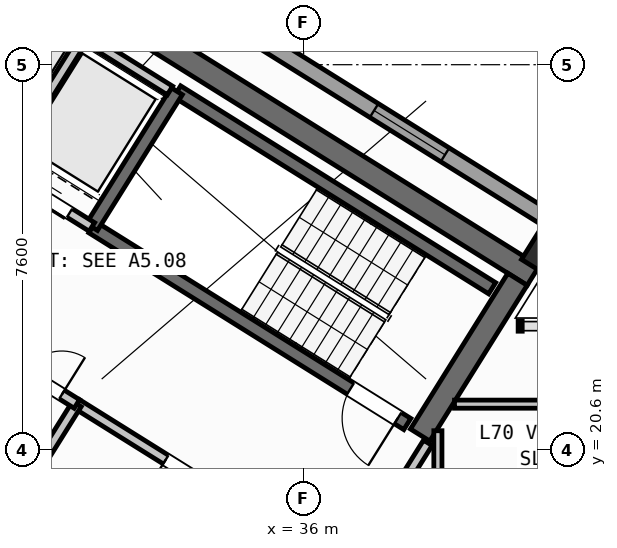
"""IFC4 building model, lengths in metres.
Left out: names, types, materials, properties, quantities, classifications, styles, units other than length and angle.
Written with IfcOpenShell. Run it as: python <this file> out.ifc"""

import sys

from ifc_helpers import new_model, si_unit, direction, frame, frame_2d, origin, origin_2d, place, context, subcontext, project, spatial, rectangle, hollow_rectangle, extrude, source, transform, mapped, element, fill, save


model = new_model("IFC4")
c1 = context("Model", 3, precision=1e-05, world=origin(), true_north=direction((0.0, 1.0)))
c2 = subcontext(c1, "Body", "Model", "MODEL_VIEW")
j1 = project(units=[si_unit("LENGTHUNIT", "METRE"), si_unit("PLANEANGLEUNIT", "RADIAN")], contexts=[c1])
p1 = place(None, origin())
s1 = spatial("IfcSite", under=j1, at=p1, CompositionType="ELEMENT")
p2 = place(p1, origin())
s2 = spatial("IfcBuilding", under=s1, at=p2, CompositionType="ELEMENT")
p3 = place(p2, frame((0.0, 0.0, 277.2)))
s3 = spatial("IfcBuildingStorey", under=s2, at=p3, CompositionType="ELEMENT", Elevation=277.2)
p4 = place(p3, frame((40.531, 24.036, 0.0), z_axis=(0.0, 0.0, 1.0), x_axis=(-0.848048787466, 0.529918157905, 0.0)))
e1 = element("IfcWall", 1, at=p4, inside=s3, PredefinedType="SHEAR", context=c2, shape_type="SweptSolid", body=[
    extrude(rectangle(XDim=13.04, YDim=0.45, at=frame_2d((6.52, 0.0))), origin(), (0.0, 0.0, 1.0), 3.35),
])
p5 = place(p3, frame((40.221, 23.965, 0.0), z_axis=(0.0, 0.0, 1.0), x_axis=(-0.529902075036, -0.848058836916, 0.0)))
e2 = element("IfcWall", 2, at=p5, inside=s3, PredefinedType="SHEAR", context=c2, shape_type="SweptSolid", body=[
    extrude(rectangle(XDim=3.625, YDim=0.45, at=frame_2d((1.812, 0.0))), origin(), (0.0, 0.0, 1.0), 3.35),
])
m1 = source(origin(), c2, "Body", "SweptSolid", [
    extrude(hollow_rectangle(XDim=0.7, YDim=0.7, WallThickness=0.028, at=origin_2d()), origin(), (0.0, 0.0, 1.0), 3.6),
])
p6 = place(p3, frame((40.783, 24.469, 0.0), z_axis=(0.0, 0.0, 1.0), x_axis=(-0.848048096156, 0.529919264233, 0.0)))
e3 = element("IfcColumn", 3, at=p6, inside=s3, PredefinedType="COLUMN", context=c2, shape_type="MappedRepresentation", body=[
    mapped(m1, transform((0.0, 0.0, 0.0), scale=1.0)),
])
p7 = place(p3, frame((14.138, 41.825, 0.0), z_axis=(0.0, 0.0, 1.0), x_axis=(0.848046498049, -0.529921821731, 0.0)))
e4 = element("IfcWall", 4, at=p7, inside=s3, PredefinedType="STANDARD", context=c2, shape_type="SweptSolid", body=[
    extrude(rectangle(XDim=31.588, YDim=0.32, at=frame_2d((15.794, 0.0))), origin(), (0.0, 0.0, 1.0), 3.35),
])
p8 = place(p7, frame((3.568, 0.0, 0.0)))
e5 = element("IfcOpeningElement", 5, at=p8, cuts=e4, PredefinedType="OPENING", context=c2, shape_type="SweptSolid", body=[
    extrude(rectangle(XDim=1.05, YDim=2.15, at=frame_2d((0.525, 1.075))), frame((0.0, 0.17, 0.0), z_axis=(0.0, -1.0, 0.0), x_axis=(1.0, 0.0, 0.0)), (0.0, 0.0, 1.0), 0.34),
])
p9 = place(p7, frame((1.046, 0.0, 0.9)))
e6 = element("IfcOpeningElement", 6, at=p9, cuts=e4, PredefinedType="OPENING", context=c2, shape_type="SweptSolid", body=[
    extrude(rectangle(XDim=1.65, YDim=1.45, at=frame_2d((0.825, 0.725))), frame((0.0, 0.17, 0.0), z_axis=(0.0, -1.0, 0.0), x_axis=(1.0, 0.0, 0.0)), (0.0, 0.0, 1.0), 0.34),
])
p10 = place(p7, frame((8.61, 0.0, 0.9)))
e7 = element("IfcOpeningElement", 7, at=p10, cuts=e4, PredefinedType="OPENING", context=c2, shape_type="SweptSolid", body=[
    extrude(rectangle(XDim=1.35, YDim=1.45, at=frame_2d((0.675, 0.725))), frame((0.0, 0.17, 0.0), z_axis=(0.0, -1.0, 0.0), x_axis=(1.0, 0.0, 0.0)), (0.0, 0.0, 1.0), 0.34),
])
p11 = place(p7, frame((13.599, 0.0, 0.95)))
e8 = element("IfcOpeningElement", 8, at=p11, cuts=e4, PredefinedType="OPENING", context=c2, shape_type="SweptSolid", body=[
    extrude(rectangle(XDim=1.95, YDim=1.35, at=frame_2d((0.975, 0.675))), frame((0.0, 0.17, 0.0), z_axis=(0.0, -1.0, 0.0), x_axis=(1.0, 0.0, 0.0)), (0.0, 0.0, 1.0), 0.34),
])
p12 = place(p7, frame((17.154, 0.0, 1.0)))
e9 = element("IfcOpeningElement", 9, at=p12, cuts=e4, PredefinedType="OPENING", context=c2, shape_type="SweptSolid", body=[
    extrude(rectangle(XDim=0.9, YDim=1.25, at=frame_2d((0.45, 0.625))), frame((0.0, 0.17, 0.0), z_axis=(0.0, -1.0, 0.0), x_axis=(1.0, 0.0, 0.0)), (0.0, 0.0, 1.0), 0.34),
])
p13 = place(p7, frame((21.719, 0.0, 0.9)))
e10 = element("IfcOpeningElement", 10, at=p13, cuts=e4, PredefinedType="OPENING", context=c2, shape_type="SweptSolid", body=[
    extrude(rectangle(XDim=1.65, YDim=1.45, at=frame_2d((0.825, 0.725))), frame((0.0, 0.17, 0.0), z_axis=(0.0, -1.0, 0.0), x_axis=(1.0, 0.0, 0.0)), (0.0, 0.0, 1.0), 0.34),
])
p14 = place(p7, frame((27.419, 0.0, 0.9)))
e11 = element("IfcOpeningElement", 11, at=p14, cuts=e4, PredefinedType="OPENING", context=c2, shape_type="SweptSolid", body=[
    extrude(rectangle(XDim=1.65, YDim=1.45, at=frame_2d((0.825, 0.725))), frame((0.0, 0.17, 0.0), z_axis=(0.0, -1.0, 0.0), x_axis=(1.0, 0.0, 0.0)), (0.0, 0.0, 1.0), 0.34),
])
p15 = place(p3, frame((31.28, 18.261, 0.0), z_axis=(0.0, 0.0, 1.0), x_axis=(-0.848051618787, 0.529913626805, 0.0)))
e12 = element("IfcWall", 12, at=p15, inside=s3, PredefinedType="SHEAR", context=c2, shape_type="SweptSolid", body=[
    extrude(rectangle(XDim=7.46, YDim=0.26, at=frame_2d((3.73, 0.0))), origin(), (0.0, 0.0, 1.0), 3.35),
])
p16 = place(p15, frame((0.36, 0.0, 0.0)))
e13 = element("IfcOpeningElement", 13, at=p16, cuts=e12, PredefinedType="OPENING", context=c2, shape_type="SweptSolid", body=[
    extrude(rectangle(XDim=0.86, YDim=2.05, at=frame_2d((0.43, 1.025))), frame((0.0, 0.14, 0.0), z_axis=(0.0, -1.0, 0.0), x_axis=(1.0, 0.0, 0.0)), (0.0, 0.0, 1.0), 0.28),
])
p17 = place(p3, frame((39.721, 23.788, 0.0), z_axis=(0.0, 0.0, 1.0), x_axis=(-0.848054434086, 0.529909121291, 0.0)))
e14 = element("IfcWall", 14, at=p17, inside=s3, PredefinedType="SHEAR", context=c2, shape_type="SweptSolid", body=[
    extrude(rectangle(XDim=7.33, YDim=0.26, at=frame_2d((3.665, 0.0))), origin(), (0.0, 0.0, 1.0), 3.35),
])
p18 = place(p3, frame((38.046, 21.108, 0.0), z_axis=(0.0, 0.0, 1.0), x_axis=(-0.848054434086, 0.529909121291, 0.0)))
e15 = element("IfcWall", 15, at=p18, inside=s3, PredefinedType="SHEAR", context=c2, shape_type="SweptSolid", body=[
    extrude(rectangle(XDim=7.33, YDim=0.26, at=frame_2d((3.665, 0.0))), origin(), (0.0, 0.0, 1.0), 3.35),
])
p19 = place(p18, frame((0.22, 0.0, 0.0)))
e16 = element("IfcOpeningElement", 16, at=p19, cuts=e15, PredefinedType="OPENING", context=c2, shape_type="SweptSolid", body=[
    extrude(rectangle(XDim=1.1, YDim=2.1, at=frame_2d((0.55, 1.05))), frame((0.0, 0.14, 0.0), z_axis=(0.0, -1.0, 0.0), x_axis=(1.0, 0.0, 0.0)), (0.0, 0.0, 1.0), 0.28),
])
p20 = place(p3, frame((33.496, 27.677, 0.0), z_axis=(0.0, 0.0, 1.0), x_axis=(-0.529908658664, -0.84805472316, 0.0)))
e17 = element("IfcWall", 17, at=p20, inside=s3, PredefinedType="SHEAR", context=c2, shape_type="SweptSolid", body=[
    extrude(rectangle(XDim=3.16, YDim=0.26, at=frame_2d((1.58, 0.0))), origin(), (0.0, 0.0, 1.0), 3.35),
])
p21 = place(p3, frame((36.459, 18.421, 0.0), z_axis=(0.0, 0.0, 1.0), x_axis=(-0.848059591691, 0.529900867089, 0.0)))
e18 = element("IfcWall", 18, at=p21, inside=s3, PredefinedType="STANDARD", context=c2, shape_type="SweptSolid", body=[
    extrude(rectangle(XDim=5.818, YDim=0.2, at=frame_2d((2.909, 0.0))), origin(), (0.0, 0.0, 1.0), 3.34),
])
p22 = place(p21, frame((2.598, 0.0, 0.0)))
e19 = element("IfcOpeningElement", 19, at=p22, cuts=e18, PredefinedType="OPENING", context=c2, shape_type="SweptSolid", body=[
    extrude(rectangle(XDim=1.15, YDim=2.1, at=frame_2d((0.575, 1.05))), frame((0.0, 0.11, 0.0), z_axis=(0.0, -1.0, 0.0), x_axis=(1.0, 0.0, 0.0)), (0.0, 0.0, 1.0), 0.22),
])
p23 = place(p3, frame((31.822, 24.998, 0.0), z_axis=(0.0, 0.0, 1.0), x_axis=(-0.848054125777, 0.529909614701, 0.0)))
e20 = element("IfcWall", 20, at=p23, inside=s3, PredefinedType="STANDARD", context=c2, shape_type="SweptSolid", body=[
    extrude(rectangle(XDim=4.668, YDim=0.2, at=frame_2d((2.334, 0.0))), origin(), (0.0, 0.0, 1.0), 3.34),
])
p24 = place(p23, frame((0.52, 0.0, 0.0)))
e21 = element("IfcOpeningElement", 21, at=p24, cuts=e20, PredefinedType="OPENING", context=c2, shape_type="SweptSolid", body=[
    extrude(rectangle(XDim=1.2, YDim=2.15, at=frame_2d((0.6, 1.075))), frame((0.0, 0.11, 0.0), z_axis=(0.0, -1.0, 0.0), x_axis=(1.0, 0.0, 0.0)), (0.0, 0.0, 1.0), 0.22),
])
p25 = place(p23, frame((2.54, 0.0, 0.0)))
e22 = element("IfcOpeningElement", 22, at=p25, cuts=e20, PredefinedType="OPENING", context=c2, shape_type="SweptSolid", body=[
    extrude(rectangle(XDim=1.2, YDim=2.15, at=frame_2d((0.6, 1.075))), frame((0.0, 0.11, 0.0), z_axis=(0.0, -1.0, 0.0), x_axis=(1.0, 0.0, 0.0)), (0.0, 0.0, 1.0), 0.22),
])
p26 = place(p3, frame((31.645, 28.716, 0.0), z_axis=(0.0, 0.0, 1.0), x_axis=(-0.52986693015, -0.848080795876, 0.0)))
e23 = element("IfcWall", 23, at=p26, inside=s3, PredefinedType="STANDARD", context=c2, shape_type="SweptSolid", body=[
    extrude(rectangle(XDim=2.66, YDim=0.2, at=frame_2d((1.33, 0.0))), origin(), (0.0, 0.0, 1.0), 3.34),
])
p27 = place(p3, frame((33.363, 27.69, 0.0), z_axis=(0.0, 0.0, 1.0), x_axis=(-0.84804957148, 0.529916903215, 0.0)))
e24 = element("IfcWall", 24, at=p27, inside=s3, PredefinedType="STANDARD", context=c2, shape_type="SweptSolid", body=[
    extrude(rectangle(XDim=4.548, YDim=0.2, at=frame_2d((2.274, 0.0))), origin(), (0.0, 0.0, 1.0), 3.34),
])
p28 = place(p3, frame((31.525, 21.504, 0.0), z_axis=(0.0, 0.0, 1.0), x_axis=(-0.529907497854, -0.848055448493, 0.0)))
e25 = element("IfcWall", 25, at=p28, inside=s3, PredefinedType="STANDARD", context=c2, shape_type="SweptSolid", body=[
    extrude(rectangle(XDim=2.88, YDim=0.2, at=frame_2d((1.44, 0.0))), origin(), (0.0, 0.0, 1.0), 3.34),
])
p29 = place(p3, frame((31.525, 21.504, 0.0), z_axis=(0.0, 0.0, 1.0), x_axis=(-0.848042066329, 0.529928913853, 0.0)))
e26 = element("IfcWall", 26, at=p29, inside=s3, PredefinedType="STANDARD", context=c2, shape_type="SweptSolid", body=[
    extrude(rectangle(XDim=6.268, YDim=0.2, at=frame_2d((3.134, 0.0))), origin(), (0.0, 0.0, 1.0), 3.34),
])
p30 = place(p29, frame((4.4, 0.0, 0.0)))
e27 = element("IfcOpeningElement", 27, at=p30, cuts=e26, PredefinedType="OPENING", context=c2, shape_type="SweptSolid", body=[
    extrude(rectangle(XDim=0.86, YDim=2.05, at=frame_2d((0.43, 1.025))), frame((0.0, 0.11, 0.0), z_axis=(0.0, -1.0, 0.0), x_axis=(1.0, 0.0, 0.0)), (0.0, 0.0, 1.0), 0.22),
])
p31 = place(p29, frame((0.35, 0.0, 0.0)))
e28 = element("IfcOpeningElement", 28, at=p31, cuts=e26, PredefinedType="OPENING", context=c2, shape_type="SweptSolid", body=[
    extrude(rectangle(XDim=0.86, YDim=2.05, at=frame_2d((0.43, 1.025))), frame((0.0, 0.11, 0.0), z_axis=(0.0, -1.0, 0.0), x_axis=(1.0, 0.0, 0.0)), (0.0, 0.0, 1.0), 0.22),
])
p32 = place(p3, frame((38.451, 20.737, 0.0), z_axis=(0.0, 0.0, 1.0), x_axis=(-0.529924799939, -0.848044637038, 0.0)))
e29 = element("IfcWall", 29, at=p32, inside=s3, PredefinedType="STANDARD", context=c2, shape_type="SweptSolid", body=[
    extrude(rectangle(XDim=2.96, YDim=0.2, at=frame_2d((1.48, 0.0))), origin(), (0.0, 0.0, 1.0), 3.34),
])
p33 = place(p32, frame((1.46, 0.0, 0.0)))
e30 = element("IfcOpeningElement", 30, at=p33, cuts=e29, PredefinedType="OPENING", context=c2, shape_type="SweptSolid", body=[
    extrude(rectangle(XDim=0.86, YDim=2.05, at=frame_2d((0.43, 1.025))), frame((0.0, 0.11, 0.0), z_axis=(0.0, -1.0, 0.0), x_axis=(1.0, 0.0, 0.0)), (0.0, 0.0, 1.0), 0.22),
])
p34 = place(p3, frame((38.65, 17.93, 0.0), z_axis=(0.0, 0.0, 1.0), x_axis=(0.0, 1.0, 0.0)))
e31 = element("IfcWall", 31, at=p34, inside=s3, PredefinedType="PARTITIONING", context=c2, shape_type="SweptSolid", body=[
    extrude(rectangle(XDim=3.046, YDim=0.16, at=frame_2d((1.523, 0.0))), origin(), (0.0, 0.0, 1.0), 3.34),
])
p35 = place(p3, frame((38.978, 21.5, 0.0), z_axis=(0.0, 0.0, 1.0), x_axis=(1.0, 0.0, 0.0)))
e32 = element("IfcWall", 32, at=p35, inside=s3, PredefinedType="PARTITIONING", context=c2, shape_type="SweptSolid", body=[
    extrude(rectangle(XDim=3.823, YDim=0.16, at=frame_2d((1.911, 0.0))), origin(), (0.0, 0.0, 1.0), 3.34),
])
m2 = source(origin(), c2, "Body", "SweptSolid", [
    extrude(rectangle(XDim=1.65, YDim=1.45, at=frame_2d((0.825, 0.725))), frame((0.0, 0.03, 0.0), z_axis=(0.0, -1.0, 0.0), x_axis=(1.0, 0.0, 0.0)), (0.0, 0.0, 1.0), 0.06),
])
p36 = place(p14, origin())
e33 = element("IfcWindow", 33, at=p36, inside=s3, PartitioningType="SINGLE_PANEL", PredefinedType="WINDOW", context=c2, shape_type="MappedRepresentation", body=[
    mapped(m2, transform((0.0, 0.0, 0.0), scale=1.0)),
])
fill(e11, e33)
m3 = source(origin(), c2, "Body", "SweptSolid", [
    extrude(rectangle(XDim=1.1, YDim=2.1, at=frame_2d((0.55, 1.05))), frame((0.0, 0.025, 0.0), z_axis=(0.0, -1.0, 0.0), x_axis=(1.0, 0.0, 0.0)), (0.0, 0.0, 1.0), 0.05),
])
p37 = place(p19, origin())
e34 = element("IfcDoor", 34, at=p37, inside=s3, OperationType="SINGLE_SWING_LEFT", PredefinedType="DOOR", context=c2, shape_type="MappedRepresentation", body=[
    mapped(m3, transform((0.0, 0.0, 0.0), scale=1.0)),
])
fill(e16, e34)
m4 = source(origin(), c2, "Body", "SweptSolid", [
    extrude(rectangle(XDim=1.15, YDim=2.1, at=frame_2d((0.575, 1.05))), frame((0.0, 0.025, 0.0), z_axis=(0.0, -1.0, 0.0), x_axis=(1.0, 0.0, 0.0)), (0.0, 0.0, 1.0), 0.05),
])
p38 = place(p22, origin())
e35 = element("IfcDoor", 35, at=p38, inside=s3, OperationType="SINGLE_SWING_RIGHT", PredefinedType="DOOR", context=c2, shape_type="MappedRepresentation", body=[
    mapped(m4, transform((0.0, 0.0, 0.0), scale=1.0)),
])
fill(e19, e35)
m5 = source(origin(), c2, "Body", "SweptSolid", [
    extrude(rectangle(XDim=1.2, YDim=2.15, at=frame_2d((0.6, 1.075))), frame((0.0, 0.025, 0.0), z_axis=(0.0, -1.0, 0.0), x_axis=(1.0, 0.0, 0.0)), (0.0, 0.0, 1.0), 0.05),
])
p39 = place(p24, origin())
e36 = element("IfcDoor", 36, at=p39, inside=s3, OperationType="DOUBLE_DOOR_SLIDING", PredefinedType="DOOR", context=c2, shape_type="MappedRepresentation", body=[
    mapped(m5, transform((0.0, 0.0, 0.0), scale=1.0)),
])
fill(e21, e36)
m6 = source(origin(), c2, "Body", "SweptSolid", [
    extrude(rectangle(XDim=0.86, YDim=2.05, at=frame_2d((0.43, 1.025))), frame((0.0, 0.025, 0.0), z_axis=(0.0, -1.0, 0.0), x_axis=(1.0, 0.0, 0.0)), (0.0, 0.0, 1.0), 0.05),
])
p40 = place(p31, frame((0.86, 0.0, 0.0), z_axis=(0.0, 0.0, 1.0), x_axis=(-1.0, 0.0, 0.0)))
e37 = element("IfcDoor", 37, at=p40, inside=s3, OperationType="SINGLE_SWING_RIGHT", PredefinedType="DOOR", context=c2, shape_type="MappedRepresentation", body=[
    mapped(m6, transform((0.0, 0.0, 0.0), scale=1.0)),
])
fill(e28, e37)
save(model, sys.argv[1])
